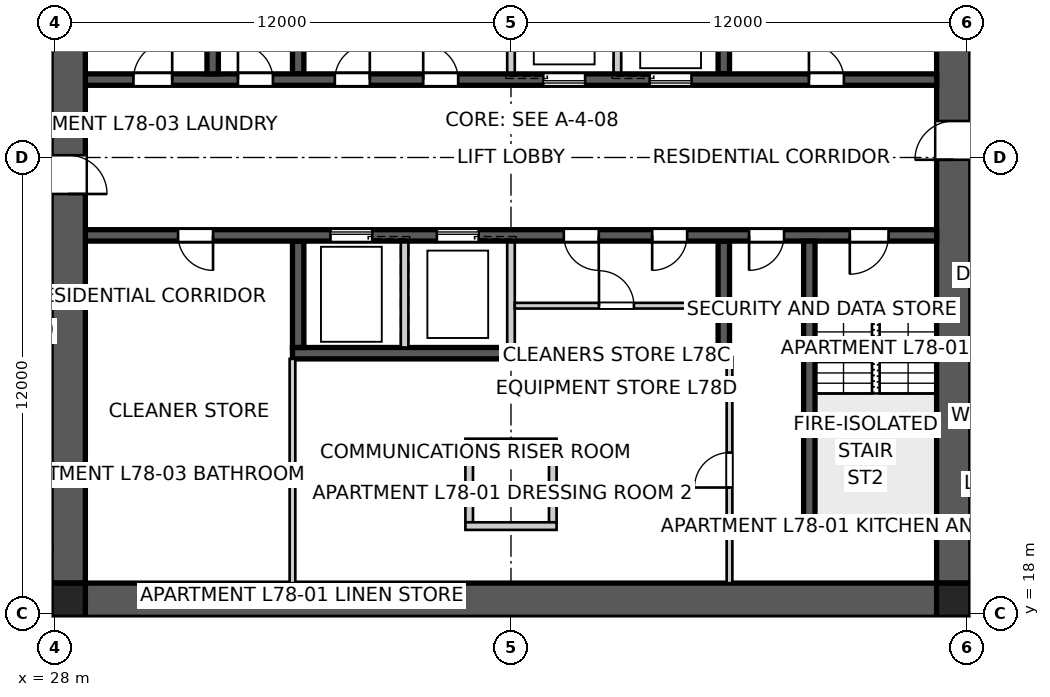
"""IFC4 building model, lengths in metres.
Left out: names, types, materials, properties, quantities, classifications, styles, units other than length and angle.
Written with IfcOpenShell. Run it as: python <this file> out.ifc"""

import sys

from ifc_helpers import new_model, si_unit, direction, frame, frame_2d, origin, origin_2d, place, context, subcontext, project, spatial, polyline, rectangle, outline, extrude, element, fill, save


model = new_model("IFC4")
c1 = context("Model", 3, precision=1e-05, world=origin(), true_north=direction((0.0, 1.0)))
c2 = subcontext(c1, "Body", "Model", "MODEL_VIEW")
j1 = project(units=[si_unit("LENGTHUNIT", "METRE"), si_unit("PLANEANGLEUNIT", "RADIAN")], contexts=[c1])
p1 = place(None, origin())
s1 = spatial("IfcSite", under=j1, at=p1, CompositionType="ELEMENT")
p2 = place(p1, origin())
s2 = spatial("IfcBuilding", under=s1, at=p2, CompositionType="ELEMENT")
p3 = place(p2, frame((0.0, 0.0, 282.8)))
s3 = spatial("IfcBuildingStorey", under=s2, at=p3, CompositionType="ELEMENT", Elevation=282.8)
p4 = place(p3, frame((51.2, 18.35, 0.0), z_axis=(0.0, 0.0, 1.0), x_axis=(-1.0, 0.0, 0.0)))
e1 = element("IfcWall", 1, at=p4, inside=s3, PredefinedType="SHEAR", context=c2, shape_type="SweptSolid", body=[
    extrude(outline(polyline([(0.0, -0.45), (22.4, -0.45), (22.4, -0.025), (22.85, -0.025), (22.85, 0.025), (22.4, 0.025), (22.4, 0.45), (0.0, 0.45), (0.0, 0.025), (-0.45, 0.025), (-0.45, -0.025), (0.0, -0.025), (0.0, -0.45)])), origin(), (0.0, 0.0, 1.0), 3.4),
])
p5 = place(p3, frame((51.65, 18.8, 0.0), z_axis=(0.0, 0.0, 1.0), x_axis=(0.0, 1.0, 0.0)))
e2 = element("IfcWall", 2, at=p5, inside=s3, PredefinedType="SHEAR", context=c2, shape_type="SweptSolid", body=[
    extrude(outline(polyline([(0.0, -0.45), (22.4, -0.45), (22.4, -0.025), (22.85, -0.025), (22.85, 0.025), (22.4, 0.025), (22.4, 0.45), (0.0, 0.45), (0.0, 0.025), (-0.45, 0.025), (-0.45, -0.025), (0.0, -0.025), (0.0, -0.45)])), origin(), (0.0, 0.0, 1.0), 3.4),
])
p6 = place(p5, frame((11.14, 0.0, 0.0)))
e3 = element("IfcOpeningElement", 3, at=p6, cuts=e2, PredefinedType="OPENING", context=c2, shape_type="SweptSolid", body=[
    extrude(rectangle(XDim=1.02, YDim=2.4, at=frame_2d((0.51, 1.2))), frame((0.0, 0.46, 0.0), z_axis=(0.0, -1.0, 0.0), x_axis=(1.0, 0.0, 0.0)), (0.0, 0.0, 1.0), 0.92),
])
p7 = place(p3, frame((28.35, 41.2, 0.0), z_axis=(0.0, 0.0, 1.0), x_axis=(0.0, -1.0, 0.0)))
e4 = element("IfcWall", 4, at=p7, inside=s3, PredefinedType="SHEAR", context=c2, shape_type="SweptSolid", body=[
    extrude(outline(polyline([(0.0, -0.45), (22.4, -0.45), (22.4, -0.025), (22.85, -0.025), (22.85, 0.025), (22.4, 0.025), (22.4, 0.45), (0.0, 0.45), (0.0, 0.025), (-0.45, 0.025), (-0.45, -0.025), (0.0, -0.025), (0.0, -0.45)])), origin(), (0.0, 0.0, 1.0), 3.4),
])
p8 = place(p7, frame((11.14, 0.0, 0.0)))
e5 = element("IfcOpeningElement", 5, at=p8, cuts=e4, PredefinedType="OPENING", context=c2, shape_type="SweptSolid", body=[
    extrude(rectangle(XDim=1.02, YDim=2.4, at=frame_2d((0.51, 1.2))), frame((0.0, 0.46, 0.0), z_axis=(0.0, -1.0, 0.0), x_axis=(1.0, 0.0, 0.0)), (0.0, 0.0, 1.0), 0.92),
])
p9 = place(p3, frame((28.8, 32.05, 0.0), z_axis=(0.0, 0.0, 1.0), x_axis=(1.0, 0.0, 0.0)))
e6 = element("IfcWall", 6, at=p9, inside=s3, PredefinedType="SHEAR", context=c2, shape_type="SweptSolid", body=[
    extrude(rectangle(XDim=22.4, YDim=0.3, at=frame_2d((11.2, 0.0))), origin(), (0.0, 0.0, 1.0), 3.4),
])
p10 = place(p9, frame((19.04, 0.0, 0.0)))
e7 = element("IfcOpeningElement", 7, at=p10, cuts=e6, PredefinedType="OPENING", context=c2, shape_type="SweptSolid", body=[
    extrude(rectangle(XDim=0.92, YDim=2.1, at=frame_2d((0.46, 1.05))), frame((0.0, 0.16, 0.0), z_axis=(0.0, -1.0, 0.0), x_axis=(1.0, 0.0, 0.0)), (0.0, 0.0, 1.0), 0.32),
])
p11 = place(p9, frame((1.265, 0.0, 0.0)))
e8 = element("IfcOpeningElement", 8, at=p11, cuts=e6, PredefinedType="OPENING", context=c2, shape_type="SweptSolid", body=[
    extrude(rectangle(XDim=1.02, YDim=2.1, at=frame_2d((0.51, 1.05))), frame((0.0, 0.16, 0.0), z_axis=(0.0, -1.0, 0.0), x_axis=(1.0, 0.0, 0.0)), (0.0, 0.0, 1.0), 0.32),
])
p12 = place(p9, frame((4.015, 0.0, 0.0)))
e9 = element("IfcOpeningElement", 9, at=p12, cuts=e6, PredefinedType="OPENING", context=c2, shape_type="SweptSolid", body=[
    extrude(rectangle(XDim=0.92, YDim=2.1, at=frame_2d((0.46, 1.05))), frame((0.0, 0.16, 0.0), z_axis=(0.0, -1.0, 0.0), x_axis=(1.0, 0.0, 0.0)), (0.0, 0.0, 1.0), 0.32),
])
p13 = place(p9, frame((6.565, 0.0, 0.0)))
e10 = element("IfcOpeningElement", 10, at=p13, cuts=e6, PredefinedType="OPENING", context=c2, shape_type="SweptSolid", body=[
    extrude(rectangle(XDim=0.92, YDim=2.1, at=frame_2d((0.46, 1.05))), frame((0.0, 0.16, 0.0), z_axis=(0.0, -1.0, 0.0), x_axis=(1.0, 0.0, 0.0)), (0.0, 0.0, 1.0), 0.32),
])
p14 = place(p9, frame((8.89, 0.0, 0.0)))
e11 = element("IfcOpeningElement", 11, at=p14, cuts=e6, PredefinedType="OPENING", context=c2, shape_type="SweptSolid", body=[
    extrude(rectangle(XDim=0.92, YDim=2.1, at=frame_2d((0.46, 1.05))), frame((0.0, 0.16, 0.0), z_axis=(0.0, -1.0, 0.0), x_axis=(1.0, 0.0, 0.0)), (0.0, 0.0, 1.0), 0.32),
])
p15 = place(p9, frame((12.05, 0.0, 0.0)))
e12 = element("IfcOpeningElement", 12, at=p15, cuts=e6, PredefinedType="OPENING", context=c2, shape_type="SweptSolid", body=[
    extrude(rectangle(XDim=1.1, YDim=2.1, at=frame_2d((0.55, 1.05))), frame((0.0, 0.16, 0.0), z_axis=(0.0, -1.0, 0.0), x_axis=(1.0, 0.0, 0.0)), (0.0, 0.0, 1.0), 0.32),
])
p16 = place(p9, frame((14.85, 0.0, 0.0)))
e13 = element("IfcOpeningElement", 13, at=p16, cuts=e6, PredefinedType="OPENING", context=c2, shape_type="SweptSolid", body=[
    extrude(rectangle(XDim=1.1, YDim=2.1, at=frame_2d((0.55, 1.05))), frame((0.0, 0.16, 0.0), z_axis=(0.0, -1.0, 0.0), x_axis=(1.0, 0.0, 0.0)), (0.0, 0.0, 1.0), 0.32),
])
p17 = place(p3, frame((51.2, 27.95, 0.0), z_axis=(0.0, 0.0, 1.0), x_axis=(-1.0, 0.0, 0.0)))
e14 = element("IfcWall", 14, at=p17, inside=s3, PredefinedType="SHEAR", context=c2, shape_type="SweptSolid", body=[
    extrude(rectangle(XDim=22.4, YDim=0.3, at=frame_2d((11.2, 0.0))), origin(), (0.0, 0.0, 1.0), 3.4),
])
p18 = place(p17, frame((19.04, 0.0, 0.0)))
e15 = element("IfcOpeningElement", 15, at=p18, cuts=e14, PredefinedType="OPENING", context=c2, shape_type="SweptSolid", body=[
    extrude(rectangle(XDim=0.92, YDim=2.1, at=frame_2d((0.46, 1.05))), frame((0.0, 0.16, 0.0), z_axis=(0.0, -1.0, 0.0), x_axis=(1.0, 0.0, 0.0)), (0.0, 0.0, 1.0), 0.32),
])
p19 = place(p17, frame((1.265, 0.0, 0.0)))
e16 = element("IfcOpeningElement", 16, at=p19, cuts=e14, PredefinedType="OPENING", context=c2, shape_type="SweptSolid", body=[
    extrude(rectangle(XDim=1.02, YDim=2.1, at=frame_2d((0.51, 1.05))), frame((0.0, 0.16, 0.0), z_axis=(0.0, -1.0, 0.0), x_axis=(1.0, 0.0, 0.0)), (0.0, 0.0, 1.0), 0.32),
])
p20 = place(p17, frame((4.015, 0.0, 0.0)))
e17 = element("IfcOpeningElement", 17, at=p20, cuts=e14, PredefinedType="OPENING", context=c2, shape_type="SweptSolid", body=[
    extrude(rectangle(XDim=0.92, YDim=2.1, at=frame_2d((0.46, 1.05))), frame((0.0, 0.16, 0.0), z_axis=(0.0, -1.0, 0.0), x_axis=(1.0, 0.0, 0.0)), (0.0, 0.0, 1.0), 0.32),
])
p21 = place(p17, frame((8.89, 0.0, 0.0)))
e18 = element("IfcOpeningElement", 18, at=p21, cuts=e14, PredefinedType="OPENING", context=c2, shape_type="SweptSolid", body=[
    extrude(rectangle(XDim=0.92, YDim=2.1, at=frame_2d((0.46, 1.05))), frame((0.0, 0.16, 0.0), z_axis=(0.0, -1.0, 0.0), x_axis=(1.0, 0.0, 0.0)), (0.0, 0.0, 1.0), 0.32),
])
p22 = place(p17, frame((6.565, 0.0, 0.0)))
e19 = element("IfcOpeningElement", 19, at=p22, cuts=e14, PredefinedType="OPENING", context=c2, shape_type="SweptSolid", body=[
    extrude(rectangle(XDim=0.92, YDim=2.1, at=frame_2d((0.46, 1.05))), frame((0.0, 0.16, 0.0), z_axis=(0.0, -1.0, 0.0), x_axis=(1.0, 0.0, 0.0)), (0.0, 0.0, 1.0), 0.32),
])
p23 = place(p17, frame((12.05, 0.0, 0.0)))
e20 = element("IfcOpeningElement", 20, at=p23, cuts=e14, PredefinedType="OPENING", context=c2, shape_type="SweptSolid", body=[
    extrude(rectangle(XDim=1.1, YDim=2.1, at=frame_2d((0.55, 1.05))), frame((0.0, 0.16, 0.0), z_axis=(0.0, -1.0, 0.0), x_axis=(1.0, 0.0, 0.0)), (0.0, 0.0, 1.0), 0.32),
])
p24 = place(p17, frame((14.85, 0.0, 0.0)))
e21 = element("IfcOpeningElement", 21, at=p24, cuts=e14, PredefinedType="OPENING", context=c2, shape_type="SweptSolid", body=[
    extrude(rectangle(XDim=1.1, YDim=2.1, at=frame_2d((0.55, 1.05))), frame((0.0, 0.16, 0.0), z_axis=(0.0, -1.0, 0.0), x_axis=(1.0, 0.0, 0.0)), (0.0, 0.0, 1.0), 0.32),
])
p25 = place(p3, frame((45.75, 24.85, 0.0), z_axis=(0.0, 0.0, 1.0), x_axis=(-1.0, 0.0, 0.0)))
e22 = element("IfcWall", 22, at=p25, inside=s3, PredefinedType="SHEAR", context=c2, shape_type="SweptSolid", body=[
    extrude(rectangle(XDim=11.5, YDim=0.3, at=frame_2d((5.75, 0.0))), origin(), (0.0, 0.0, 1.0), 3.4),
])
for number, where, z_axis, x_axis in (
    (23, (34.4, 32.2, 0.0), (0.0, 0.0, 1.0), (0.0, 1.0, 0.0)),
    (24, (45.6, 27.8, 0.0), (0.0, 0.0, 1.0), (0.0, -1.0, 0.0)),
):
    element("IfcWall", number, at=place(p3, frame(where, z_axis=z_axis, x_axis=x_axis)), inside=s3, PredefinedType="SHEAR", context=c2, shape_type="SweptSolid", body=[
        extrude(rectangle(XDim=2.8, YDim=0.3, at=frame_2d((1.4, 0.0))), origin(), (0.0, 0.0, 1.0), 3.4),
    ])
for number, where, z_axis, x_axis in (
    (25, (40.0, 32.2, 0.0), (0.0, 0.0, 1.0), (0.0, 1.0, 0.0)),
    (26, (40.0, 27.8, 0.0), (0.0, 0.0, 1.0), (0.0, -1.0, 0.0)),
    (27, (42.8, 32.2, 0.0), (0.0, 0.0, 1.0), (0.0, 1.0, 0.0)),
    (28, (37.2, 27.8, 0.0), (0.0, 0.0, 1.0), (0.0, -1.0, 0.0)),
):
    element("IfcWall", number, at=place(p3, frame(where, z_axis=z_axis, x_axis=x_axis)), inside=s3, PredefinedType="SOLIDWALL", context=c2, shape_type="SweptSolid", body=[
        extrude(rectangle(XDim=2.8, YDim=0.2, at=frame_2d((1.4, 0.0))), origin(), (0.0, 0.0, 1.0), 3.4),
    ])
for number, where, z_axis, x_axis in (
    (29, (45.6, 32.2, 0.0), (0.0, 0.0, 1.0), (0.0, 1.0, 0.0)),
    (30, (34.4, 27.8, 0.0), (0.0, 0.0, 1.0), (0.0, -1.0, 0.0)),
):
    element("IfcWall", number, at=place(p3, frame(where, z_axis=z_axis, x_axis=x_axis)), inside=s3, PredefinedType="SHEAR", context=c2, shape_type="SweptSolid", body=[
        extrude(rectangle(XDim=2.8, YDim=0.3, at=frame_2d((1.4, 0.0))), origin(), (0.0, 0.0, 1.0), 3.4),
    ])
for number, where, z_axis, x_axis in (
    (31, (32.15, 32.2, 0.0), (0.0, 0.0, 1.0), (0.0, 1.0, 0.0)),
    (32, (47.85, 27.8, 0.0), (0.0, 0.0, 1.0), (0.0, -1.0, 0.0)),
):
    element("IfcWall", number, at=place(p3, frame(where, z_axis=z_axis, x_axis=x_axis)), inside=s3, PredefinedType="SHEAR", context=c2, shape_type="SweptSolid", body=[
        extrude(rectangle(XDim=7.7, YDim=0.3, at=frame_2d((3.85, 0.0))), origin(), (0.0, 0.0, 1.0), 3.4),
    ])
p26 = place(p3, frame((51.2, 20.25, 0.0), z_axis=(0.0, 0.0, 1.0), x_axis=(-1.0, 0.0, 0.0)))
e33 = element("IfcWall", 33, at=p26, inside=s3, PredefinedType="SHEAR", context=c2, shape_type="SweptSolid", body=[
    extrude(rectangle(XDim=3.5, YDim=0.3, at=frame_2d((1.75, 0.0))), origin(), (0.0, 0.0, 1.0), 3.4),
])
for number, where, z_axis, x_axis in (
    (34, (38.9, 22.4, 0.0), (0.0, 0.0, 1.0), (0.0, -1.0, 0.0)),
    (35, (41.1, 22.4, 0.0), (0.0, 0.0, 1.0), (0.0, -1.0, 0.0)),
):
    element("IfcWall", number, at=place(p3, frame(where, z_axis=z_axis, x_axis=x_axis)), inside=s3, PredefinedType="SOLIDWALL", context=c2, shape_type="SweptSolid", body=[
        extrude(rectangle(XDim=2.0, YDim=0.2, at=frame_2d((1.0, 0.0))), origin(), (0.0, 0.0, 1.0), 3.4),
    ])
for number, where, z_axis, x_axis in (
    (36, (38.8, 22.5, 0.0), (0.0, 0.0, 1.0), (1.0, 0.0, 0.0)),
    (37, (38.8, 20.3, 0.0), (0.0, 0.0, 1.0), (1.0, 0.0, 0.0)),
):
    element("IfcWall", number, at=place(p3, frame(where, z_axis=z_axis, x_axis=x_axis)), inside=s3, PredefinedType="SOLIDWALL", context=c2, shape_type="SweptSolid", body=[
        extrude(rectangle(XDim=2.4, YDim=0.2, at=frame_2d((1.2, 0.0))), origin(), (0.0, 0.0, 1.0), 3.4),
    ])
for number, where, z_axis, x_axis in (
    (38, (28.35, 18.35, 0.0), (0.0, 0.0, 1.0), (1.0, 0.0, 0.0)),
    (39, (51.65, 18.35, 0.0), (0.0, 0.0, 1.0), (1.0, 0.0, 0.0)),
):
    element("IfcColumn", number, at=place(p3, frame(where, z_axis=z_axis, x_axis=x_axis)), inside=s3, PredefinedType="COLUMN", context=c2, shape_type="SweptSolid", body=[
        extrude(rectangle(XDim=0.9, YDim=0.9, at=origin_2d()), origin(), (0.0, 0.0, 1.0), 3.4),
    ])
p27 = place(p3, frame((24.296, 16.823, 0.0), z_axis=(0.0, 0.0, 1.0), x_axis=(0.76603440109, 0.64279957712, 0.0)))
e40 = element("IfcWall", 40, at=p27, inside=s3, PredefinedType="PARTITIONING", context=c2, shape_type="SweptSolid", body=[
    extrude(rectangle(XDim=4.64, YDim=0.25, at=frame_2d((2.32, 0.0))), origin(), (0.0, 0.0, 1.0), 3.25),
])
p28 = place(p3, frame((45.75, 18.8, 0.0), z_axis=(0.0, 0.0, 1.0), x_axis=(0.0, 1.0, 0.0)))
e41 = element("IfcWall", 41, at=p28, inside=s3, PredefinedType="SOLIDWALL", context=c2, shape_type="SweptSolid", body=[
    extrude(rectangle(XDim=5.95, YDim=0.15, at=frame_2d((2.975, 0.0))), origin(), (0.0, 0.0, 1.0), 3.25),
])
p29 = place(p28, frame((2.515, 0.0, 0.0)))
e42 = element("IfcOpeningElement", 42, at=p29, cuts=e41, PredefinedType="OPENING", context=c2, shape_type="SweptSolid", body=[
    extrude(rectangle(XDim=0.92, YDim=2.1, at=frame_2d((0.46, 1.05))), frame((0.0, 0.085, 0.0), z_axis=(0.0, -1.0, 0.0), x_axis=(1.0, 0.0, 0.0)), (0.0, 0.0, 1.0), 0.17),
])
p30 = place(p3, frame((34.25, 18.8, 0.0), z_axis=(0.0, 0.0, 1.0), x_axis=(0.0, 1.0, 0.0)))
e43 = element("IfcWall", 43, at=p30, inside=s3, PredefinedType="SOLIDWALL", context=c2, shape_type="SweptSolid", body=[
    extrude(rectangle(XDim=5.9, YDim=0.15, at=frame_2d((2.95, 0.0))), origin(), (0.0, 0.0, 1.0), 3.25),
])
p31 = place(p3, frame((51.625, 17.9, 0.0), z_axis=(0.0, 0.0, 1.0), x_axis=(0.027925096799, 0.999610018442, 0.0)))
e44 = element("IfcWall", 44, at=p31, inside=s3, PredefinedType="SOLIDWALL", context=c2, shape_type="SweptSolid", body=[
    extrude(rectangle(XDim=0.9, YDim=0.15, at=frame_2d((0.45, 0.0))), origin(), (0.0, 0.0, 1.0), 3.25),
])
p32 = place(p3, frame((40.1, 26.1, 0.0), z_axis=(0.0, 0.0, 1.0), x_axis=(1.0, 0.0, 0.0)))
e45 = element("IfcWall", 45, at=p32, inside=s3, PredefinedType="SOLIDWALL", context=c2, shape_type="SweptSolid", body=[
    extrude(rectangle(XDim=5.35, YDim=0.15, at=frame_2d((2.675, 0.0))), origin(), (0.0, 0.0, 1.0), 3.25),
])
p33 = place(p32, frame((2.215, 0.0, 0.0)))
e46 = element("IfcOpeningElement", 46, at=p33, cuts=e45, PredefinedType="OPENING", context=c2, shape_type="SweptSolid", body=[
    extrude(rectangle(XDim=0.92, YDim=2.1, at=frame_2d((0.46, 1.05))), frame((0.0, 0.085, 0.0), z_axis=(0.0, -1.0, 0.0), x_axis=(1.0, 0.0, 0.0)), (0.0, 0.0, 1.0), 0.17),
])
p34 = place(p10, origin())
e47 = element("IfcDoor", 47, at=p34, inside=s3, OperationType="SINGLE_SWING_LEFT", PredefinedType="DOOR", context=c2, shape_type="SweptSolid", body=[
    extrude(rectangle(XDim=0.92, YDim=2.1, at=frame_2d((0.46, 1.05))), frame((0.0, 0.025, 0.0), z_axis=(0.0, -1.0, 0.0), x_axis=(1.0, 0.0, 0.0)), (0.0, 0.0, 1.0), 0.05),
])
fill(e7, e47)
p35 = place(p18, origin())
e48 = element("IfcDoor", 48, at=p35, inside=s3, OperationType="SINGLE_SWING_LEFT", PredefinedType="DOOR", context=c2, shape_type="SweptSolid", body=[
    extrude(rectangle(XDim=0.92, YDim=2.1, at=frame_2d((0.46, 1.05))), frame((0.0, 0.025, 0.0), z_axis=(0.0, -1.0, 0.0), x_axis=(1.0, 0.0, 0.0)), (0.0, 0.0, 1.0), 0.05),
])
fill(e15, e48)
p36 = place(p19, origin())
e49 = element("IfcDoor", 49, at=p36, inside=s3, OperationType="SINGLE_SWING_RIGHT", PredefinedType="DOOR", context=c2, shape_type="SweptSolid", body=[
    extrude(rectangle(XDim=1.02, YDim=2.1, at=frame_2d((0.51, 1.05))), frame((0.0, 0.025, 0.0), z_axis=(0.0, -1.0, 0.0), x_axis=(1.0, 0.0, 0.0)), (0.0, 0.0, 1.0), 0.05),
])
fill(e16, e49)
p37 = place(p11, origin())
e50 = element("IfcDoor", 50, at=p37, inside=s3, OperationType="SINGLE_SWING_RIGHT", PredefinedType="DOOR", context=c2, shape_type="SweptSolid", body=[
    extrude(rectangle(XDim=1.02, YDim=2.1, at=frame_2d((0.51, 1.05))), frame((0.0, 0.025, 0.0), z_axis=(0.0, -1.0, 0.0), x_axis=(1.0, 0.0, 0.0)), (0.0, 0.0, 1.0), 0.05),
])
fill(e8, e50)
p38 = place(p12, origin())
e51 = element("IfcDoor", 51, at=p38, inside=s3, OperationType="SINGLE_SWING_LEFT", PredefinedType="DOOR", context=c2, shape_type="SweptSolid", body=[
    extrude(rectangle(XDim=0.92, YDim=2.1, at=frame_2d((0.46, 1.05))), frame((0.0, 0.025, 0.0), z_axis=(0.0, -1.0, 0.0), x_axis=(1.0, 0.0, 0.0)), (0.0, 0.0, 1.0), 0.05),
])
fill(e9, e51)
p39 = place(p20, origin())
e52 = element("IfcDoor", 52, at=p39, inside=s3, OperationType="SINGLE_SWING_RIGHT", PredefinedType="DOOR", context=c2, shape_type="SweptSolid", body=[
    extrude(rectangle(XDim=0.92, YDim=2.1, at=frame_2d((0.46, 1.05))), frame((0.0, 0.025, 0.0), z_axis=(0.0, -1.0, 0.0), x_axis=(1.0, 0.0, 0.0)), (0.0, 0.0, 1.0), 0.05),
])
fill(e17, e52)
p40 = place(p29, origin())
e53 = element("IfcDoor", 53, at=p40, inside=s3, OperationType="SINGLE_SWING_LEFT", PredefinedType="DOOR", context=c2, shape_type="SweptSolid", body=[
    extrude(rectangle(XDim=0.92, YDim=2.1, at=frame_2d((0.46, 1.05))), frame((0.0, 0.025, 0.0), z_axis=(0.0, -1.0, 0.0), x_axis=(1.0, 0.0, 0.0)), (0.0, 0.0, 1.0), 0.05),
])
fill(e42, e53)
p41 = place(p13, origin())
e54 = element("IfcDoor", 54, at=p41, inside=s3, OperationType="SINGLE_SWING_RIGHT", PredefinedType="DOOR", context=c2, shape_type="SweptSolid", body=[
    extrude(rectangle(XDim=0.92, YDim=2.1, at=frame_2d((0.46, 1.05))), frame((0.0, 0.025, 0.0), z_axis=(0.0, -1.0, 0.0), x_axis=(1.0, 0.0, 0.0)), (0.0, 0.0, 1.0), 0.05),
])
fill(e10, e54)
p42 = place(p14, origin())
e55 = element("IfcDoor", 55, at=p42, inside=s3, OperationType="SINGLE_SWING_LEFT", PredefinedType="DOOR", context=c2, shape_type="SweptSolid", body=[
    extrude(rectangle(XDim=0.92, YDim=2.1, at=frame_2d((0.46, 1.05))), frame((0.0, 0.025, 0.0), z_axis=(0.0, -1.0, 0.0), x_axis=(1.0, 0.0, 0.0)), (0.0, 0.0, 1.0), 0.05),
])
fill(e11, e55)
p43 = place(p21, origin())
e56 = element("IfcDoor", 56, at=p43, inside=s3, OperationType="SINGLE_SWING_LEFT", PredefinedType="DOOR", context=c2, shape_type="SweptSolid", body=[
    extrude(rectangle(XDim=0.92, YDim=2.1, at=frame_2d((0.46, 1.05))), frame((0.0, 0.025, 0.0), z_axis=(0.0, -1.0, 0.0), x_axis=(1.0, 0.0, 0.0)), (0.0, 0.0, 1.0), 0.05),
])
fill(e18, e56)
p44 = place(p22, origin())
e57 = element("IfcDoor", 57, at=p44, inside=s3, OperationType="SINGLE_SWING_RIGHT", PredefinedType="DOOR", context=c2, shape_type="SweptSolid", body=[
    extrude(rectangle(XDim=0.92, YDim=2.1, at=frame_2d((0.46, 1.05))), frame((0.0, 0.025, 0.0), z_axis=(0.0, -1.0, 0.0), x_axis=(1.0, 0.0, 0.0)), (0.0, 0.0, 1.0), 0.05),
])
fill(e19, e57)
p45 = place(p33, origin())
e58 = element("IfcDoor", 58, at=p45, inside=s3, OperationType="SINGLE_SWING_LEFT", PredefinedType="DOOR", context=c2, shape_type="SweptSolid", body=[
    extrude(rectangle(XDim=0.92, YDim=2.1, at=frame_2d((0.46, 1.05))), frame((0.0, 0.025, 0.0), z_axis=(0.0, -1.0, 0.0), x_axis=(1.0, 0.0, 0.0)), (0.0, 0.0, 1.0), 0.05),
])
fill(e46, e58)
p46 = place(p6, origin())
e59 = element("IfcDoor", 59, at=p46, inside=s3, OperationType="SINGLE_SWING_LEFT", PredefinedType="DOOR", context=c2, shape_type="SweptSolid", body=[
    extrude(rectangle(XDim=1.02, YDim=2.4, at=frame_2d((0.51, 1.2))), frame((0.0, 0.025, 0.0), z_axis=(0.0, -1.0, 0.0), x_axis=(1.0, 0.0, 0.0)), (0.0, 0.0, 1.0), 0.05),
])
fill(e3, e59)
p47 = place(p8, origin())
e60 = element("IfcDoor", 60, at=p47, inside=s3, OperationType="SINGLE_SWING_RIGHT", PredefinedType="DOOR", context=c2, shape_type="SweptSolid", body=[
    extrude(rectangle(XDim=1.02, YDim=2.4, at=frame_2d((0.51, 1.2))), frame((0.0, 0.025, 0.0), z_axis=(0.0, -1.0, 0.0), x_axis=(1.0, 0.0, 0.0)), (0.0, 0.0, 1.0), 0.05),
])
fill(e5, e60)
p48 = place(p15, origin())
e61 = element("IfcDoor", 61, at=p48, inside=s3, OperationType="SLIDING_TO_LEFT", PredefinedType="DOOR", context=c2, shape_type="SweptSolid", body=[
    extrude(rectangle(XDim=1.1, YDim=2.1, at=frame_2d((0.55, 1.05))), frame((0.0, 0.025, 0.0), z_axis=(0.0, -1.0, 0.0), x_axis=(1.0, 0.0, 0.0)), (0.0, 0.0, 1.0), 0.05),
])
fill(e12, e61)
p49 = place(p23, origin())
e62 = element("IfcDoor", 62, at=p49, inside=s3, OperationType="SLIDING_TO_LEFT", PredefinedType="DOOR", context=c2, shape_type="SweptSolid", body=[
    extrude(rectangle(XDim=1.1, YDim=2.1, at=frame_2d((0.55, 1.05))), frame((0.0, 0.025, 0.0), z_axis=(0.0, -1.0, 0.0), x_axis=(1.0, 0.0, 0.0)), (0.0, 0.0, 1.0), 0.05),
])
fill(e20, e62)
p50 = place(p16, origin())
e63 = element("IfcDoor", 63, at=p50, inside=s3, OperationType="SLIDING_TO_LEFT", PredefinedType="DOOR", context=c2, shape_type="SweptSolid", body=[
    extrude(rectangle(XDim=1.1, YDim=2.1, at=frame_2d((0.55, 1.05))), frame((0.0, 0.025, 0.0), z_axis=(0.0, -1.0, 0.0), x_axis=(1.0, 0.0, 0.0)), (0.0, 0.0, 1.0), 0.05),
])
fill(e13, e63)
p51 = place(p24, origin())
e64 = element("IfcDoor", 64, at=p51, inside=s3, OperationType="SLIDING_TO_LEFT", PredefinedType="DOOR", context=c2, shape_type="SweptSolid", body=[
    extrude(rectangle(XDim=1.1, YDim=2.1, at=frame_2d((0.55, 1.05))), frame((0.0, 0.025, 0.0), z_axis=(0.0, -1.0, 0.0), x_axis=(1.0, 0.0, 0.0)), (0.0, 0.0, 1.0), 0.05),
])
fill(e21, e64)
save(model, sys.argv[1])
